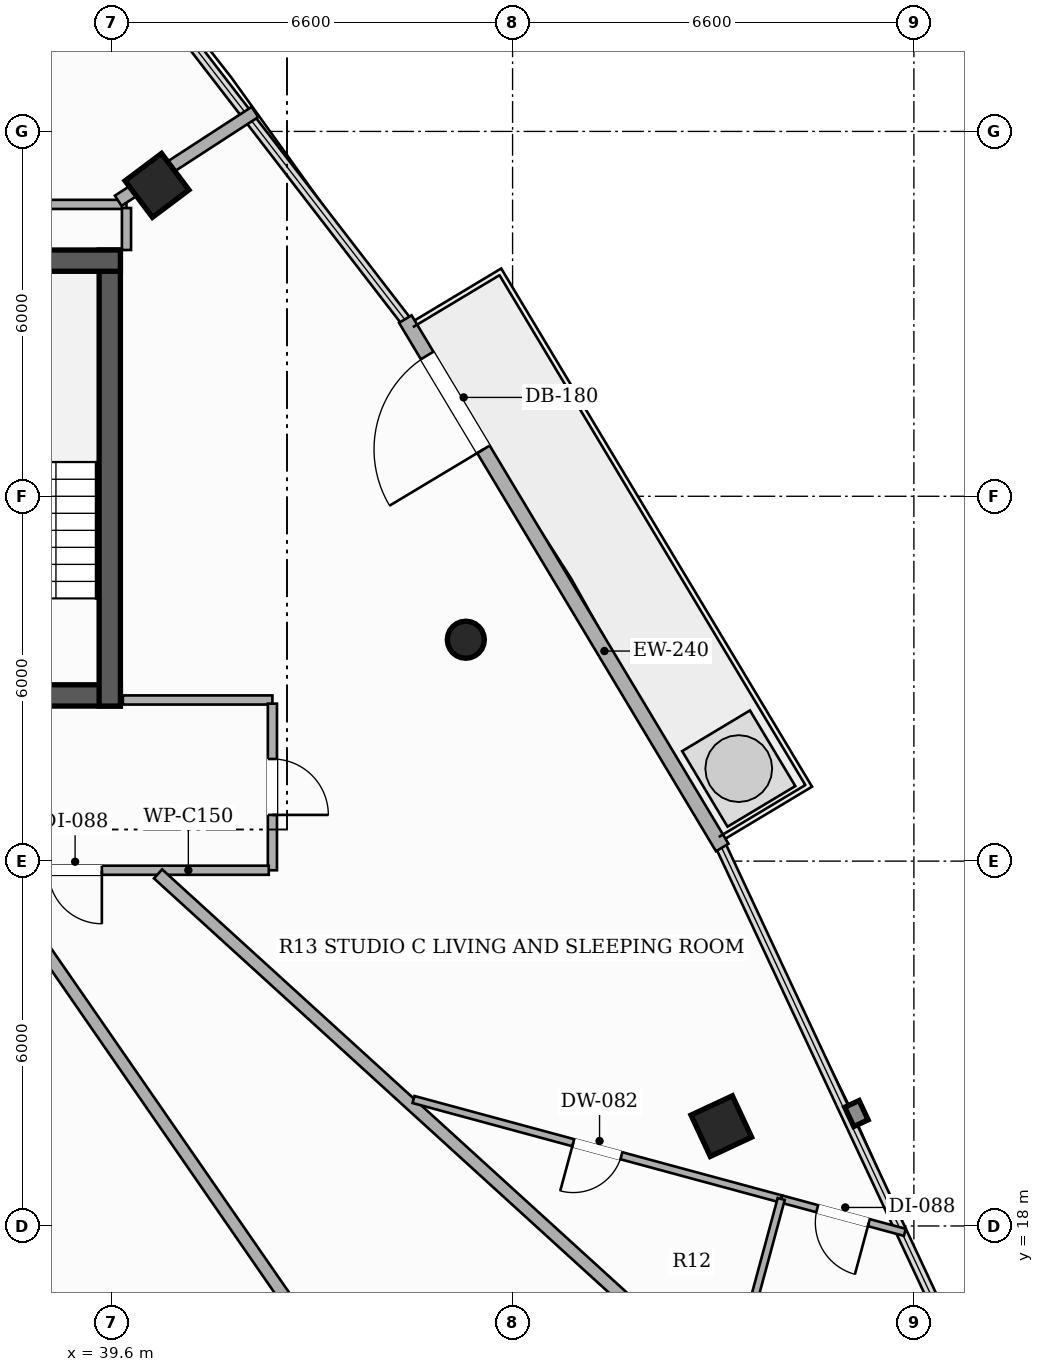
"""IFC4 building model, lengths in metres.
Left out: names, types, materials, properties, quantities, classifications, styles, units other than length and angle.
Written with IfcOpenShell. Run it as: python <this file> out.ifc"""

import sys

from ifc_helpers import new_model, si_unit, direction, frame, frame_2d, origin, origin_2d, place, context, subcontext, project, spatial, rectangle, hollow_rectangle, hollow_circle, extrude, element, fill, save


model = new_model("IFC4")
c1 = context("Model", 3, precision=1e-05, world=origin(), true_north=direction((0.0, 1.0)))
c2 = subcontext(c1, "Body", "Model", "MODEL_VIEW")
j1 = project(units=[si_unit("LENGTHUNIT", "METRE"), si_unit("PLANEANGLEUNIT", "RADIAN")], contexts=[c1])
p1 = place(None, origin())
s1 = spatial("IfcSite", under=j1, at=p1, CompositionType="ELEMENT")
p2 = place(p1, origin())
s2 = spatial("IfcBuilding", under=s1, at=p2, CompositionType="ELEMENT")
p3 = place(p2, frame((0.0, 0.0, 226.1)))
s3 = spatial("IfcBuildingStorey", under=s2, at=p3, CompositionType="ELEMENT", Elevation=226.1)
p4 = place(p3, frame((26.25, 26.725, 0.0), z_axis=(0.0, 0.0, 1.0), x_axis=(1.0, 0.0, 0.0)))
e1 = element("IfcWall", 1, at=p4, inside=s3, PredefinedType="SHEAR", context=c2, shape_type="SweptSolid", body=[
    extrude(rectangle(XDim=13.5, YDim=0.35, at=frame_2d((6.75, 0.0))), origin(), (0.0, 0.0, 1.0), 3.3),
])
p5 = place(p4, frame((4.35, 0.0, 0.0)))
e2 = element("IfcOpeningElement", 2, at=p5, cuts=e1, PredefinedType="OPENING", context=c2, shape_type="SweptSolid", body=[
    extrude(rectangle(XDim=1.05, YDim=2.15, at=frame_2d((0.525, 1.075))), frame((0.0, 0.185, 0.0), z_axis=(0.0, -1.0, 0.0), x_axis=(1.0, 0.0, 0.0)), (0.0, 0.0, 1.0), 0.37),
])
p6 = place(p4, frame((8.3, 0.0, 0.0)))
e3 = element("IfcOpeningElement", 3, at=p6, cuts=e1, PredefinedType="OPENING", context=c2, shape_type="SweptSolid", body=[
    extrude(rectangle(XDim=1.05, YDim=2.15, at=frame_2d((0.525, 1.075))), frame((0.0, 0.185, 0.0), z_axis=(0.0, -1.0, 0.0), x_axis=(1.0, 0.0, 0.0)), (0.0, 0.0, 1.0), 0.37),
])
p7 = place(p3, frame((39.575, 26.55, 0.0), z_axis=(0.0, 0.0, 1.0), x_axis=(0.0, 1.0, 0.0)))
e4 = element("IfcWall", 4, at=p7, inside=s3, PredefinedType="SHEAR", context=c2, shape_type="SweptSolid", body=[
    extrude(rectangle(XDim=7.5, YDim=0.35, at=frame_2d((3.75, 0.0))), origin(), (0.0, 0.0, 1.0), 3.3),
])
p8 = place(p3, frame((36.15, 33.875, 0.0), z_axis=(0.0, 0.0, 1.0), x_axis=(1.0, 0.0, 0.0)))
e5 = element("IfcWall", 5, at=p8, inside=s3, PredefinedType="SHEAR", context=c2, shape_type="SweptSolid", body=[
    extrude(rectangle(XDim=3.6, YDim=0.35, at=frame_2d((1.8, 0.0))), origin(), (0.0, 0.0, 1.0), 3.3),
])
p9 = place(p3, frame((49.633, 19.642, 0.0), z_axis=(0.0, 0.0, 1.0), x_axis=(-0.422618261741, 0.906307787037, 0.0)))
e6 = element("IfcColumn", 6, at=p9, inside=s3, PredefinedType="COLUMN", context=c2, shape_type="SweptSolid", body=[
    extrude(hollow_rectangle(XDim=0.75, YDim=0.75, WallThickness=0.025, at=origin_2d()), origin(), (0.0, 0.0, 1.0), 3.3),
])
p10 = place(p3, frame((45.431, 27.641, 0.0), z_axis=(0.0, 0.0, 1.0), x_axis=(1.0, 0.0, 0.0)))
e7 = element("IfcColumn", 7, at=p10, inside=s3, PredefinedType="COLUMN", context=c2, shape_type="SweptSolid", body=[
    extrude(hollow_circle(Radius=0.305, WallThickness=0.016, at=origin_2d()), origin(), (0.0, 0.0, 1.0), 3.3),
])
p11 = place(p3, frame((40.352, 35.113, 0.0), z_axis=(0.0, 0.0, 1.0), x_axis=(-0.600420225326, 0.799684658487, 0.0)))
e8 = element("IfcColumn", 8, at=p11, inside=s3, PredefinedType="COLUMN", context=c2, shape_type="SweptSolid", body=[
    extrude(hollow_rectangle(XDim=0.75, YDim=0.75, WallThickness=0.025, at=origin_2d()), origin(), (0.0, 0.0, 1.0), 3.3),
])
p12 = place(p3, frame((49.648, 24.224, 0.0), z_axis=(0.0, 0.0, 1.0), x_axis=(-0.514346935205, 0.857582200285, 0.0)))
e9 = element("IfcWall", 9, at=p12, inside=s3, PredefinedType="SOLIDWALL", context=c2, shape_type="SweptSolid", body=[
    extrude(rectangle(XDim=10.133, YDim=0.24, at=frame_2d((5.066, 0.0))), origin(), (0.0, 0.0, 1.0), 2.624),
])
p13 = place(p12, frame((7.635, 0.0, 0.0)))
e10 = element("IfcOpeningElement", 10, at=p13, cuts=e9, PredefinedType="OPENING", context=c2, shape_type="SweptSolid", body=[
    extrude(rectangle(XDim=1.8, YDim=2.2, at=frame_2d((0.9, 1.1))), frame((0.0, 0.13, 0.0), z_axis=(0.0, -1.0, 0.0), x_axis=(1.0, 0.0, 0.0)), (0.0, 0.0, 1.0), 0.26),
])
p14 = place(p3, frame((39.79, 26.65, 0.0), z_axis=(0.0, 0.0, 1.0), x_axis=(1.0, 0.0, 0.0)))
e11 = element("IfcWall", 11, at=p14, inside=s3, PredefinedType="PARTITIONING", context=c2, shape_type="SweptSolid", body=[
    extrude(rectangle(XDim=2.46, YDim=0.15, at=frame_2d((1.23, 0.0))), origin(), (0.0, 0.0, 1.0), 2.565),
])
p15 = place(p3, frame((42.25, 26.59, 0.0), z_axis=(0.0, 0.0, 1.0), x_axis=(0.0, -1.0, 0.0)))
e12 = element("IfcWall", 12, at=p15, inside=s3, PredefinedType="PARTITIONING", context=c2, shape_type="SweptSolid", body=[
    extrude(rectangle(XDim=2.74, YDim=0.15, at=frame_2d((1.37, 0.0))), origin(), (0.0, 0.0, 1.0), 2.773),
])
p16 = place(p15, frame((0.91, 0.0, 0.0)))
e13 = element("IfcOpeningElement", 13, at=p16, cuts=e12, PredefinedType="OPENING", context=c2, shape_type="SweptSolid", body=[
    extrude(rectangle(XDim=0.92, YDim=2.15, at=frame_2d((0.46, 1.075))), frame((0.0, 0.085, 0.0), z_axis=(0.0, -1.0, 0.0), x_axis=(1.0, 0.0, 0.0)), (0.0, 0.0, 1.0), 0.17),
])
p17 = place(p3, frame((42.19, 23.85, 0.0), z_axis=(0.0, 0.0, 1.0), x_axis=(-1.0, 0.0, 0.0)))
e14 = element("IfcWall", 14, at=p17, inside=s3, PredefinedType="PARTITIONING", context=c2, shape_type="SweptSolid", body=[
    extrude(rectangle(XDim=8.286, YDim=0.15, at=frame_2d((4.143, 0.0))), origin(), (0.0, 0.0, 1.0), 2.565),
])
p18 = place(p17, frame((5.824, 0.0, 0.0)))
e15 = element("IfcOpeningElement", 15, at=p18, cuts=e14, PredefinedType="OPENING", context=c2, shape_type="SweptSolid", body=[
    extrude(rectangle(XDim=0.88, YDim=2.1, at=frame_2d((0.44, 1.05))), frame((0.0, 0.085, 0.0), z_axis=(0.0, -1.0, 0.0), x_axis=(1.0, 0.0, 0.0)), (0.0, 0.0, 1.0), 0.17),
])
p19 = place(p17, frame((2.745, 0.0, 0.0)))
e16 = element("IfcOpeningElement", 16, at=p19, cuts=e14, PredefinedType="OPENING", context=c2, shape_type="SweptSolid", body=[
    extrude(rectangle(XDim=0.88, YDim=2.1, at=frame_2d((0.44, 1.05))), frame((0.0, 0.085, 0.0), z_axis=(0.0, -1.0, 0.0), x_axis=(1.0, 0.0, 0.0)), (0.0, 0.0, 1.0), 0.17),
])
p20 = place(p3, frame((36.31, 34.8, 0.0), z_axis=(0.0, 0.0, 1.0), x_axis=(1.0, 0.0, 0.0)))
e17 = element("IfcWall", 17, at=p20, inside=s3, PredefinedType="PARTITIONING", context=c2, shape_type="SweptSolid", body=[
    extrude(rectangle(XDim=3.54, YDim=0.15, at=frame_2d((1.77, 0.0))), origin(), (0.0, 0.0, 1.0), 2.425),
])
p21 = place(p3, frame((39.85, 34.74, 0.0), z_axis=(0.0, 0.0, 1.0), x_axis=(0.0, -1.0, 0.0)))
e18 = element("IfcWall", 18, at=p21, inside=s3, PredefinedType="PARTITIONING", context=c2, shape_type="SweptSolid", body=[
    extrude(rectangle(XDim=0.69, YDim=0.15, at=frame_2d((0.345, 0.0))), origin(), (0.0, 0.0, 1.0), 2.773),
])
p22 = place(p3, frame((37.641, 23.79, 0.0), z_axis=(0.0, 0.0, 1.0), x_axis=(0.568876812748, -0.822422745258, 0.0)))
e19 = element("IfcWall", 19, at=p22, inside=s3, PredefinedType="PARTITIONING", context=c2, shape_type="SweptSolid", body=[
    extrude(rectangle(XDim=21.342, YDim=0.2, at=frame_2d((10.671, 0.0))), origin(), (0.0, 0.0, 1.0), 2.492),
])
p23 = place(p3, frame((55.919, 9.631, 0.0), z_axis=(0.0, 0.0, 1.0), x_axis=(-0.739406671307, 0.673259069324, 0.0)))
e20 = element("IfcWall", 20, at=p23, inside=s3, PredefinedType="PARTITIONING", context=c2, shape_type="SweptSolid", body=[
    extrude(rectangle(XDim=21.031, YDim=0.2, at=frame_2d((10.515, 0.0))), origin(), (0.0, 0.0, 1.0), 2.492),
])
p24 = place(p3, frame((39.714, 34.86, 0.0), z_axis=(0.0, 0.0, 1.0), x_axis=(0.838740992226, 0.54453057578, 0.0)))
e21 = element("IfcWall", 21, at=p24, inside=s3, PredefinedType="PARTITIONING", context=c2, shape_type="SweptSolid", body=[
    extrude(rectangle(XDim=2.681, YDim=0.2, at=frame_2d((1.341, 0.0))), origin(), (0.0, 0.0, 1.0), 2.492),
])
p25 = place(p3, frame((50.618, 18.444, 0.0), z_axis=(0.0, 0.0, 1.0), x_axis=(-0.96530580675, 0.261122001091, 0.0)))
e22 = element("IfcWall", 22, at=p25, inside=s3, PredefinedType="PARTITIONING", context=c2, shape_type="SweptSolid", body=[
    extrude(rectangle(XDim=6.265, YDim=0.12, at=frame_2d((3.133, 0.0))), origin(), (0.0, 0.0, 1.0), 2.492),
])
p26 = place(p25, frame((2.723, 0.0, 0.0)))
e23 = element("IfcOpeningElement", 23, at=p26, cuts=e22, PredefinedType="OPENING", context=c2, shape_type="SweptSolid", body=[
    extrude(rectangle(XDim=0.82, YDim=2.1, at=frame_2d((0.41, 1.05))), frame((0.0, 0.07, 0.0), z_axis=(0.0, -1.0, 0.0), x_axis=(1.0, 0.0, 0.0)), (0.0, 0.0, 1.0), 0.14),
])
p27 = place(p3, frame((52.651, 17.895, 0.0), z_axis=(0.0, 0.0, 1.0), x_axis=(-0.96540836449, 0.260742573765, 0.0)))
e24 = element("IfcWall", 24, at=p27, inside=s3, PredefinedType="PARTITIONING", context=c2, shape_type="SweptSolid", body=[
    extrude(rectangle(XDim=2.106, YDim=0.12, at=frame_2d((1.053, 0.0))), origin(), (0.0, 0.0, 1.0), 2.619),
])
p28 = place(p27, frame((0.613, 0.0, 0.0)))
e25 = element("IfcOpeningElement", 25, at=p28, cuts=e24, PredefinedType="OPENING", context=c2, shape_type="SweptSolid", body=[
    extrude(rectangle(XDim=0.88, YDim=2.1, at=frame_2d((0.44, 1.05))), frame((0.0, 0.07, 0.0), z_axis=(0.0, -1.0, 0.0), x_axis=(1.0, 0.0, 0.0)), (0.0, 0.0, 1.0), 0.14),
])
p29 = place(p3, frame((50.618, 18.444, 0.0), z_axis=(0.0, 0.0, 1.0), x_axis=(-0.260928129887, -0.965358229381, 0.0)))
e26 = element("IfcWall", 26, at=p29, inside=s3, PredefinedType="PARTITIONING", context=c2, shape_type="SweptSolid", body=[
    extrude(rectangle(XDim=3.219, YDim=0.12, at=frame_2d((1.609, 0.0))), origin(), (0.0, 0.0, 1.0), 2.492),
])
p30 = place(p13, origin())
e27 = element("IfcDoor", 27, at=p30, inside=s3, OperationType="SINGLE_SWING_LEFT", PredefinedType="DOOR", context=c2, shape_type="SweptSolid", body=[
    extrude(rectangle(XDim=1.8, YDim=2.2, at=frame_2d((0.9, 1.1))), frame((0.0, 0.025, 0.0), z_axis=(0.0, -1.0, 0.0), x_axis=(1.0, 0.0, 0.0)), (0.0, 0.0, 1.0), 0.05),
])
fill(e10, e27)
p31 = place(p16, origin())
e28 = element("IfcDoor", 28, at=p31, inside=s3, OperationType="SINGLE_SWING_RIGHT", PredefinedType="DOOR", context=c2, shape_type="SweptSolid", body=[
    extrude(rectangle(XDim=0.92, YDim=2.15, at=frame_2d((0.46, 1.075))), frame((0.0, 0.025, 0.0), z_axis=(0.0, -1.0, 0.0), x_axis=(1.0, 0.0, 0.0)), (0.0, 0.0, 1.0), 0.05),
])
fill(e13, e28)
p32 = place(p26, origin())
e29 = element("IfcDoor", 29, at=p32, inside=s3, OperationType="SINGLE_SWING_RIGHT", PredefinedType="DOOR", context=c2, shape_type="SweptSolid", body=[
    extrude(rectangle(XDim=0.82, YDim=2.1, at=frame_2d((0.41, 1.05))), frame((0.0, 0.025, 0.0), z_axis=(0.0, -1.0, 0.0), x_axis=(1.0, 0.0, 0.0)), (0.0, 0.0, 1.0), 0.05),
])
fill(e23, e29)
p33 = place(p28, origin())
e30 = element("IfcDoor", 30, at=p33, inside=s3, OperationType="SINGLE_SWING_LEFT", PredefinedType="DOOR", context=c2, shape_type="SweptSolid", body=[
    extrude(rectangle(XDim=0.88, YDim=2.1, at=frame_2d((0.44, 1.05))), frame((0.0, 0.025, 0.0), z_axis=(0.0, -1.0, 0.0), x_axis=(1.0, 0.0, 0.0)), (0.0, 0.0, 1.0), 0.05),
])
fill(e25, e30)
p34 = place(p19, origin())
e31 = element("IfcDoor", 31, at=p34, inside=s3, OperationType="SINGLE_SWING_LEFT", PredefinedType="DOOR", context=c2, shape_type="SweptSolid", body=[
    extrude(rectangle(XDim=0.88, YDim=2.1, at=frame_2d((0.44, 1.05))), frame((0.0, 0.025, 0.0), z_axis=(0.0, -1.0, 0.0), x_axis=(1.0, 0.0, 0.0)), (0.0, 0.0, 1.0), 0.05),
])
fill(e16, e31)
save(model, sys.argv[1])
